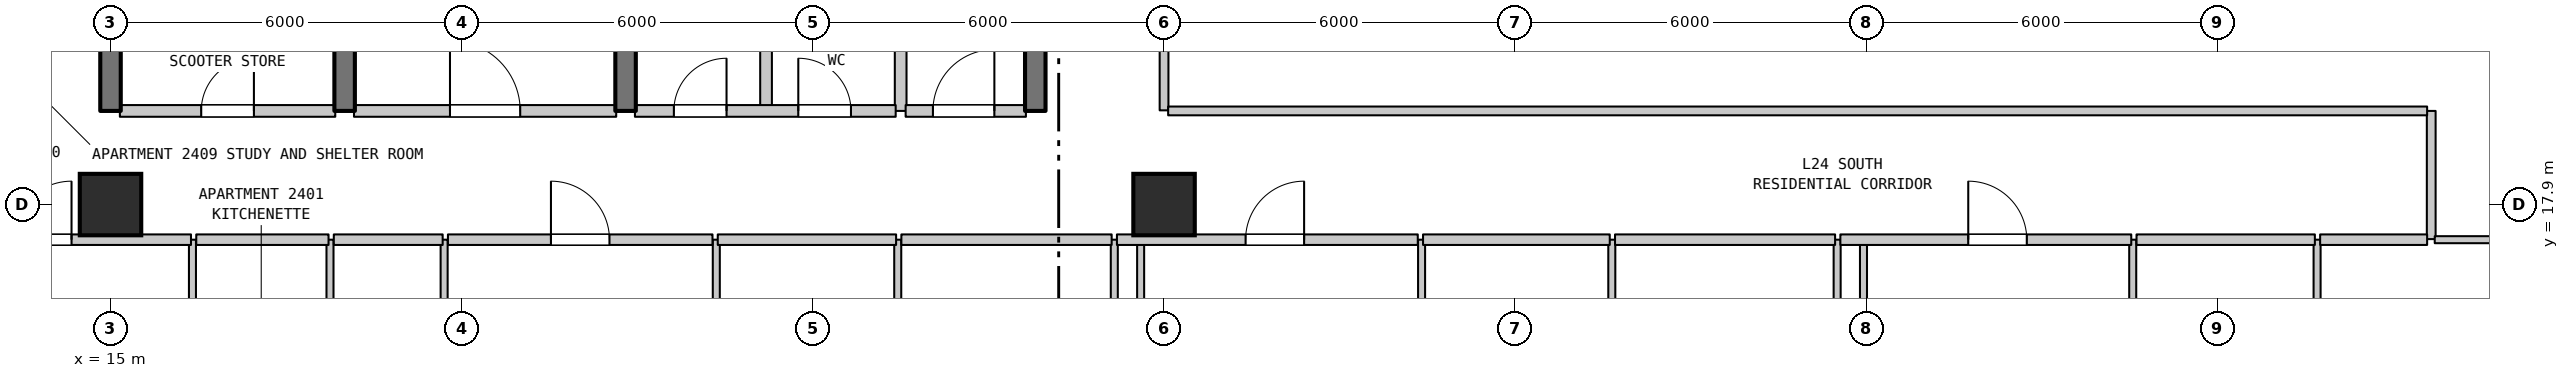
"""IFC4 building model, lengths in metres.
Left out: names, types, materials, properties, quantities, classifications, styles, units other than length and angle.
Written with IfcOpenShell. Run it as: python <this file> out.ifc"""

import sys

from ifc_helpers import new_model, si_unit, direction, frame, frame_2d, origin, origin_2d, place, context, subcontext, project, spatial, rectangle, extrude, element, fill, save


model = new_model("IFC4")
c1 = context("Model", 3, precision=1e-05, world=origin(), true_north=direction((0.0, 1.0)))
c2 = subcontext(c1, "Body", "Model", "MODEL_VIEW")
j1 = project(units=[si_unit("LENGTHUNIT", "METRE"), si_unit("PLANEANGLEUNIT", "RADIAN")], contexts=[c1])
p1 = place(None, origin())
s1 = spatial("IfcSite", under=j1, at=p1, CompositionType="ELEMENT")
p2 = place(p1, origin())
s2 = spatial("IfcBuilding", under=s1, at=p2, CompositionType="ELEMENT")
p3 = place(p2, frame((0.0, 0.0, 102.0)))
s3 = spatial("IfcBuildingStorey", under=s2, at=p3, CompositionType="ELEMENT", Elevation=102.0)
for number, where, z_axis, x_axis in (
    (1, (15.0, 17.9, 0.0), (0.0, 0.0, 1.0), (1.0, 0.0, 0.0)),
    (2, (33.0, 17.9, 0.0), (0.0, 0.0, 1.0), (1.0, 0.0, 0.0)),
):
    element("IfcColumn", number, at=place(p3, frame(where, z_axis=z_axis, x_axis=x_axis)), inside=s3, PredefinedType="COLUMN", context=c2, shape_type="SweptSolid", body=[
        extrude(rectangle(XDim=1.05, YDim=1.05, at=origin_2d()), origin(), (0.0, 0.0, 1.0), 3.7),
    ])
p4 = place(p3, frame((15.0, 19.5, 0.0), z_axis=(0.0, 0.0, 1.0), x_axis=(0.0, 1.0, 0.0)))
e3 = element("IfcWall", 3, at=p4, inside=s3, PredefinedType="SHEAR", context=c2, shape_type="SweptSolid", body=[
    extrude(rectangle(XDim=3.2, YDim=0.35, at=frame_2d((1.6, 0.0))), origin(), (0.0, 0.0, 1.0), 3.385),
])
p5 = place(p3, frame((16.4, 14.1, 0.0), z_axis=(0.0, 0.0, 1.0), x_axis=(0.0, 1.0, 0.0)))
e4 = element("IfcWall", 4, at=p5, inside=s3, PredefinedType="PARTITIONING", context=c2, shape_type="SweptSolid", body=[
    extrude(rectangle(XDim=3.2, YDim=0.12, at=frame_2d((1.6, 0.0))), origin(), (0.0, 0.0, 1.0), 3.385),
])
p6 = place(p5, frame((1.15, 0.0, 0.0)))
e5 = element("IfcOpeningElement", 5, at=p6, cuts=e4, PredefinedType="OPENING", context=c2, shape_type="SweptSolid", body=[
    extrude(rectangle(XDim=0.9, YDim=2.15, at=frame_2d((0.45, 1.075))), frame((0.0, 0.07, 0.0), z_axis=(0.0, -1.0, 0.0), x_axis=(1.0, 0.0, 0.0)), (0.0, 0.0, 1.0), 0.14),
])
p7 = place(p3, frame((18.75, 14.1, 0.0), z_axis=(0.0, 0.0, 1.0), x_axis=(0.0, 1.0, 0.0)))
e6 = element("IfcWall", 6, at=p7, inside=s3, PredefinedType="PARTITIONING", context=c2, shape_type="SweptSolid", body=[
    extrude(rectangle(XDim=3.2, YDim=0.12, at=frame_2d((1.6, 0.0))), origin(), (0.0, 0.0, 1.0), 3.385),
])
p8 = place(p3, frame((19.0, 19.5, 0.0), z_axis=(0.0, 0.0, 1.0), x_axis=(0.0, 1.0, 0.0)))
e7 = element("IfcWall", 7, at=p8, inside=s3, PredefinedType="SHEAR", context=c2, shape_type="SweptSolid", body=[
    extrude(rectangle(XDim=3.2, YDim=0.35, at=frame_2d((1.6, 0.0))), origin(), (0.0, 0.0, 1.0), 3.385),
])
p9 = place(p3, frame((20.7, 6.977, 0.0), z_axis=(0.0, 0.0, 1.0), x_axis=(0.0, 1.0, 0.0)))
e8 = element("IfcWall", 8, at=p9, inside=s3, PredefinedType="PARTITIONING", context=c2, shape_type="SweptSolid", body=[
    extrude(rectangle(XDim=10.323, YDim=0.12, at=frame_2d((5.162, 0.0))), origin(), (0.0, 0.0, 1.0), 3.385),
])
p10 = place(p3, frame((23.8, 19.5, 0.0), z_axis=(0.0, 0.0, 1.0), x_axis=(0.0, 1.0, 0.0)))
e9 = element("IfcWall", 9, at=p10, inside=s3, PredefinedType="SHEAR", context=c2, shape_type="SweptSolid", body=[
    extrude(rectangle(XDim=3.2, YDim=0.35, at=frame_2d((1.6, 0.0))), origin(), (0.0, 0.0, 1.0), 3.385),
])
p11 = place(p3, frame((25.35, 11.15, 0.0), z_axis=(0.0, 0.0, 1.0), x_axis=(0.0, 1.0, 0.0)))
e10 = element("IfcWall", 10, at=p11, inside=s3, PredefinedType="PARTITIONING", context=c2, shape_type="SweptSolid", body=[
    extrude(rectangle(XDim=6.15, YDim=0.12, at=frame_2d((3.075, 0.0))), origin(), (0.0, 0.0, 1.0), 3.385),
])
p12 = place(p3, frame((26.2, 19.5, 0.0), z_axis=(0.0, 0.0, 1.0), x_axis=(0.0, 1.0, 0.0)))
e11 = element("IfcWall", 11, at=p12, inside=s3, PredefinedType="STANDARD", context=c2, shape_type="SweptSolid", body=[
    extrude(rectangle(XDim=3.2, YDim=0.2, at=frame_2d((1.6, 0.0))), origin(), (0.0, 0.0, 1.0), 3.385),
])
p13 = place(p3, frame((28.45, 11.15, 0.0), z_axis=(0.0, 0.0, 1.0), x_axis=(0.0, 1.0, 0.0)))
e12 = element("IfcWall", 12, at=p13, inside=s3, PredefinedType="PARTITIONING", context=c2, shape_type="SweptSolid", body=[
    extrude(rectangle(XDim=6.15, YDim=0.12, at=frame_2d((3.075, 0.0))), origin(), (0.0, 0.0, 1.0), 3.385),
])
p14 = place(p3, frame((28.5, 19.5, 0.0), z_axis=(0.0, 0.0, 1.0), x_axis=(0.0, 1.0, 0.0)))
e13 = element("IfcWall", 13, at=p14, inside=s3, PredefinedType="STANDARD", context=c2, shape_type="SweptSolid", body=[
    extrude(rectangle(XDim=3.2, YDim=0.2, at=frame_2d((1.6, 0.0))), origin(), (0.0, 0.0, 1.0), 3.385),
])
p15 = place(p3, frame((30.8, 19.5, 0.0), z_axis=(0.0, 0.0, 1.0), x_axis=(0.0, 1.0, 0.0)))
e14 = element("IfcWall", 14, at=p15, inside=s3, PredefinedType="SHEAR", context=c2, shape_type="SweptSolid", body=[
    extrude(rectangle(XDim=3.2, YDim=0.35, at=frame_2d((1.6, 0.0))), origin(), (0.0, 0.0, 1.0), 3.385),
])
p16 = place(p3, frame((32.15, 11.15, 0.0), z_axis=(0.0, 0.0, 1.0), x_axis=(0.0, 1.0, 0.0)))
e15 = element("IfcWall", 15, at=p16, inside=s3, PredefinedType="PARTITIONING", context=c2, shape_type="SweptSolid", body=[
    extrude(rectangle(XDim=6.15, YDim=0.12, at=frame_2d((3.075, 0.0))), origin(), (0.0, 0.0, 1.0), 3.385),
])
p17 = place(p3, frame((32.6, 14.85, 0.0), z_axis=(0.0, 0.0, 1.0), x_axis=(0.0, 1.0, 0.0)))
e16 = element("IfcWall", 16, at=p17, inside=s3, PredefinedType="PARTITIONING", context=c2, shape_type="SweptSolid", body=[
    extrude(rectangle(XDim=2.45, YDim=0.12, at=frame_2d((1.225, 0.0))), origin(), (0.0, 0.0, 1.0), 3.385),
])
p18 = place(p3, frame((33.0, 19.51, 0.0), z_axis=(0.0, 0.0, 1.0), x_axis=(0.0, 1.0, 0.0)))
e17 = element("IfcWall", 17, at=p18, inside=s3, PredefinedType="STANDARD", context=c2, shape_type="SweptSolid", body=[
    extrude(rectangle(XDim=6.18, YDim=0.15, at=frame_2d((3.09, 0.0))), origin(), (0.0, 0.0, 1.0), 2.935),
])
for number, where, z_axis, x_axis in (
    (18, (37.4, 11.15, 0.0), (0.0, 0.0, 1.0), (0.0, 1.0, 0.0)),
    (19, (40.65, 11.15, 0.0), (0.0, 0.0, 1.0), (0.0, 1.0, 0.0)),
    (20, (44.5, 11.15, 0.0), (0.0, 0.0, 1.0), (0.0, 1.0, 0.0)),
):
    element("IfcWall", number, at=place(p3, frame(where, z_axis=z_axis, x_axis=x_axis)), inside=s3, PredefinedType="PARTITIONING", context=c2, shape_type="SweptSolid", body=[
        extrude(rectangle(XDim=6.15, YDim=0.12, at=frame_2d((3.075, 0.0))), origin(), (0.0, 0.0, 1.0), 3.385),
    ])
p19 = place(p3, frame((44.95, 0.71, 0.0), z_axis=(0.0, 0.0, 1.0), x_axis=(0.0, 1.0, 0.0)))
e21 = element("IfcWall", 21, at=p19, inside=s3, PredefinedType="PARTITIONING", context=c2, shape_type="SweptSolid", body=[
    extrude(rectangle(XDim=16.59, YDim=0.12, at=frame_2d((8.295, 0.0))), origin(), (0.0, 0.0, 1.0), 3.385),
])
for number, where, z_axis, x_axis in (
    (22, (49.55, 11.15, 0.0), (0.0, 0.0, 1.0), (0.0, 1.0, 0.0)),
    (23, (52.7, 11.15, 0.0), (0.0, 0.0, 1.0), (0.0, 1.0, 0.0)),
):
    element("IfcWall", number, at=place(p3, frame(where, z_axis=z_axis, x_axis=x_axis)), inside=s3, PredefinedType="PARTITIONING", context=c2, shape_type="SweptSolid", body=[
        extrude(rectangle(XDim=6.15, YDim=0.12, at=frame_2d((3.075, 0.0))), origin(), (0.0, 0.0, 1.0), 3.385),
    ])
p20 = place(p3, frame((54.65, 17.31, 0.0), z_axis=(0.0, 0.0, 1.0), x_axis=(0.0, 1.0, 0.0)))
e24 = element("IfcWall", 24, at=p20, inside=s3, PredefinedType="STANDARD", context=c2, shape_type="SweptSolid", body=[
    extrude(rectangle(XDim=2.19, YDim=0.15, at=frame_2d((1.095, 0.0))), origin(), (0.0, 0.0, 1.0), 3.385),
])
p21 = place(p3, frame((12.875, 17.3, 0.0), z_axis=(0.0, 0.0, 1.0), x_axis=(1.0, 0.0, 0.0)))
e25 = element("IfcWall", 25, at=p21, inside=s3, PredefinedType="STANDARD", context=c2, shape_type="SweptSolid", body=[
    extrude(rectangle(XDim=3.5, YDim=0.18, at=frame_2d((1.75, 0.0))), origin(), (0.0, 0.0, 1.0), 3.385),
])
p22 = place(p21, frame((0.459, 0.0, 0.0)))
e26 = element("IfcOpeningElement", 26, at=p22, cuts=e25, PredefinedType="OPENING", context=c2, shape_type="SweptSolid", body=[
    extrude(rectangle(XDim=1.0, YDim=2.15, at=frame_2d((0.5, 1.075))), frame((0.0, 0.1, 0.0), z_axis=(0.0, -1.0, 0.0), x_axis=(1.0, 0.0, 0.0)), (0.0, 0.0, 1.0), 0.2),
])
p23 = place(p3, frame((16.465, 17.3, 0.0), z_axis=(0.0, 0.0, 1.0), x_axis=(1.0, 0.0, 0.0)))
e27 = element("IfcWall", 27, at=p23, inside=s3, PredefinedType="STANDARD", context=c2, shape_type="SweptSolid", body=[
    extrude(rectangle(XDim=2.26, YDim=0.18, at=frame_2d((1.13, 0.0))), origin(), (0.0, 0.0, 1.0), 3.385),
])
p24 = place(p3, frame((18.815, 17.3, 0.0), z_axis=(0.0, 0.0, 1.0), x_axis=(1.0, 0.0, 0.0)))
e28 = element("IfcWall", 28, at=p24, inside=s3, PredefinedType="STANDARD", context=c2, shape_type="SweptSolid", body=[
    extrude(rectangle(XDim=1.86, YDim=0.18, at=frame_2d((0.93, 0.0))), origin(), (0.0, 0.0, 1.0), 3.385),
])
p25 = place(p3, frame((20.765, 17.3, 0.0), z_axis=(0.0, 0.0, 1.0), x_axis=(1.0, 0.0, 0.0)))
e29 = element("IfcWall", 29, at=p25, inside=s3, PredefinedType="STANDARD", context=c2, shape_type="SweptSolid", body=[
    extrude(rectangle(XDim=4.52, YDim=0.18, at=frame_2d((2.26, 0.0))), origin(), (0.0, 0.0, 1.0), 3.385),
])
p26 = place(p25, frame((1.76, 0.0, 0.0)))
e30 = element("IfcOpeningElement", 30, at=p26, cuts=e29, PredefinedType="OPENING", context=c2, shape_type="SweptSolid", body=[
    extrude(rectangle(XDim=1.0, YDim=2.15, at=frame_2d((0.5, 1.075))), frame((0.0, 0.1, 0.0), z_axis=(0.0, -1.0, 0.0), x_axis=(1.0, 0.0, 0.0)), (0.0, 0.0, 1.0), 0.2),
])
p27 = place(p3, frame((25.375, 17.3, 0.0), z_axis=(0.0, 0.0, 1.0), x_axis=(1.0, 0.0, 0.0)))
e31 = element("IfcWall", 31, at=p27, inside=s3, PredefinedType="STANDARD", context=c2, shape_type="SweptSolid", body=[
    extrude(rectangle(XDim=3.047, YDim=0.18, at=frame_2d((1.523, 0.0))), origin(), (0.0, 0.0, 1.0), 3.385),
])
p28 = place(p3, frame((28.512, 17.3, 0.0), z_axis=(0.0, 0.0, 1.0), x_axis=(1.0, 0.0, 0.0)))
e32 = element("IfcWall", 32, at=p28, inside=s3, PredefinedType="STANDARD", context=c2, shape_type="SweptSolid", body=[
    extrude(rectangle(XDim=3.593, YDim=0.18, at=frame_2d((1.796, 0.0))), origin(), (0.0, 0.0, 1.0), 3.385),
])
p29 = place(p3, frame((32.195, 17.3, 0.0), z_axis=(0.0, 0.0, 1.0), x_axis=(1.0, 0.0, 0.0)))
e33 = element("IfcWall", 33, at=p29, inside=s3, PredefinedType="STANDARD", context=c2, shape_type="SweptSolid", body=[
    extrude(rectangle(XDim=5.14, YDim=0.18, at=frame_2d((2.57, 0.0))), origin(), (0.0, 0.0, 1.0), 3.385),
])
p30 = place(p29, frame((2.198, 0.0, 0.0)))
e34 = element("IfcOpeningElement", 34, at=p30, cuts=e33, PredefinedType="OPENING", context=c2, shape_type="SweptSolid", body=[
    extrude(rectangle(XDim=1.0, YDim=2.15, at=frame_2d((0.5, 1.075))), frame((0.0, 0.1, 0.0), z_axis=(0.0, -1.0, 0.0), x_axis=(1.0, 0.0, 0.0)), (0.0, 0.0, 1.0), 0.2),
])
p31 = place(p3, frame((37.425, 17.3, 0.0), z_axis=(0.0, 0.0, 1.0), x_axis=(1.0, 0.0, 0.0)))
e35 = element("IfcWall", 35, at=p31, inside=s3, PredefinedType="STANDARD", context=c2, shape_type="SweptSolid", body=[
    extrude(rectangle(XDim=3.19, YDim=0.18, at=frame_2d((1.595, 0.0))), origin(), (0.0, 0.0, 1.0), 3.385),
])
p32 = place(p3, frame((40.705, 17.3, 0.0), z_axis=(0.0, 0.0, 1.0), x_axis=(1.0, 0.0, 0.0)))
e36 = element("IfcWall", 36, at=p32, inside=s3, PredefinedType="STANDARD", context=c2, shape_type="SweptSolid", body=[
    extrude(rectangle(XDim=3.76, YDim=0.18, at=frame_2d((1.88, 0.0))), origin(), (0.0, 0.0, 1.0), 3.385),
])
p33 = place(p3, frame((44.555, 17.3, 0.0), z_axis=(0.0, 0.0, 1.0), x_axis=(1.0, 0.0, 0.0)))
e37 = element("IfcWall", 37, at=p33, inside=s3, PredefinedType="STANDARD", context=c2, shape_type="SweptSolid", body=[
    extrude(rectangle(XDim=4.97, YDim=0.18, at=frame_2d((2.485, 0.0))), origin(), (0.0, 0.0, 1.0), 3.385),
])
p34 = place(p33, frame((2.185, 0.0, 0.0)))
e38 = element("IfcOpeningElement", 38, at=p34, cuts=e37, PredefinedType="OPENING", context=c2, shape_type="SweptSolid", body=[
    extrude(rectangle(XDim=1.0, YDim=2.15, at=frame_2d((0.5, 1.075))), frame((0.0, 0.1, 0.0), z_axis=(0.0, -1.0, 0.0), x_axis=(1.0, 0.0, 0.0)), (0.0, 0.0, 1.0), 0.2),
])
p35 = place(p3, frame((49.615, 17.3, 0.0), z_axis=(0.0, 0.0, 1.0), x_axis=(1.0, 0.0, 0.0)))
e39 = element("IfcWall", 39, at=p35, inside=s3, PredefinedType="STANDARD", context=c2, shape_type="SweptSolid", body=[
    extrude(rectangle(XDim=3.047, YDim=0.18, at=frame_2d((1.523, 0.0))), origin(), (0.0, 0.0, 1.0), 3.385),
])
p36 = place(p3, frame((52.752, 17.3, 0.0), z_axis=(0.0, 0.0, 1.0), x_axis=(1.0, 0.0, 0.0)))
e40 = element("IfcWall", 40, at=p36, inside=s3, PredefinedType="STANDARD", context=c2, shape_type="SweptSolid", body=[
    extrude(rectangle(XDim=1.828, YDim=0.18, at=frame_2d((0.914, 0.0))), origin(), (0.0, 0.0, 1.0), 3.385),
])
p37 = place(p3, frame((54.71, 17.3, 0.0), z_axis=(0.0, 0.0, 1.0), x_axis=(1.0, 0.0, 0.0)))
e41 = element("IfcWall", 41, at=p37, inside=s3, PredefinedType="PARTITIONING", context=c2, shape_type="SweptSolid", body=[
    extrude(rectangle(XDim=1.635, YDim=0.12, at=frame_2d((0.817, 0.0))), origin(), (0.0, 0.0, 1.0), 3.385),
])
p38 = place(p3, frame((15.16, 19.5, 0.0), z_axis=(0.0, 0.0, 1.0), x_axis=(1.0, 0.0, 0.0)))
e42 = element("IfcWall", 42, at=p38, inside=s3, PredefinedType="STANDARD", context=c2, shape_type="SweptSolid", body=[
    extrude(rectangle(XDim=3.68, YDim=0.2, at=frame_2d((1.84, 0.0))), origin(), (0.0, 0.0, 1.0), 3.385),
])
p39 = place(p38, frame((1.39, 0.0, 0.0)))
e43 = element("IfcOpeningElement", 43, at=p39, cuts=e42, PredefinedType="OPENING", context=c2, shape_type="SweptSolid", body=[
    extrude(rectangle(XDim=0.9, YDim=2.15, at=frame_2d((0.45, 1.075))), frame((0.0, 0.11, 0.0), z_axis=(0.0, -1.0, 0.0), x_axis=(1.0, 0.0, 0.0)), (0.0, 0.0, 1.0), 0.22),
])
p40 = place(p3, frame((19.16, 19.5, 0.0), z_axis=(0.0, 0.0, 1.0), x_axis=(1.0, 0.0, 0.0)))
e44 = element("IfcWall", 44, at=p40, inside=s3, PredefinedType="STANDARD", context=c2, shape_type="SweptSolid", body=[
    extrude(rectangle(XDim=4.48, YDim=0.2, at=frame_2d((2.24, 0.0))), origin(), (0.0, 0.0, 1.0), 3.385),
])
p41 = place(p40, frame((1.64, 0.0, 0.0)))
e45 = element("IfcOpeningElement", 45, at=p41, cuts=e44, PredefinedType="OPENING", context=c2, shape_type="SweptSolid", body=[
    extrude(rectangle(XDim=1.2, YDim=2.2, at=frame_2d((0.6, 1.1))), frame((0.0, 0.11, 0.0), z_axis=(0.0, -1.0, 0.0), x_axis=(1.0, 0.0, 0.0)), (0.0, 0.0, 1.0), 0.22),
])
p42 = place(p3, frame((23.96, 19.5, 0.0), z_axis=(0.0, 0.0, 1.0), x_axis=(1.0, 0.0, 0.0)))
e46 = element("IfcWall", 46, at=p42, inside=s3, PredefinedType="STANDARD", context=c2, shape_type="SweptSolid", body=[
    extrude(rectangle(XDim=4.455, YDim=0.2, at=frame_2d((2.228, 0.0))), origin(), (0.0, 0.0, 1.0), 3.385),
])
p43 = place(p42, frame((0.665, 0.0, 0.0)))
e47 = element("IfcOpeningElement", 47, at=p43, cuts=e46, PredefinedType="OPENING", context=c2, shape_type="SweptSolid", body=[
    extrude(rectangle(XDim=0.9, YDim=2.15, at=frame_2d((0.45, 1.075))), frame((0.0, 0.11, 0.0), z_axis=(0.0, -1.0, 0.0), x_axis=(1.0, 0.0, 0.0)), (0.0, 0.0, 1.0), 0.22),
])
p44 = place(p42, frame((2.791, 0.0, 0.0)))
e48 = element("IfcOpeningElement", 48, at=p44, cuts=e46, PredefinedType="OPENING", context=c2, shape_type="SweptSolid", body=[
    extrude(rectangle(XDim=0.9, YDim=2.15, at=frame_2d((0.45, 1.075))), frame((0.0, 0.11, 0.0), z_axis=(0.0, -1.0, 0.0), x_axis=(1.0, 0.0, 0.0)), (0.0, 0.0, 1.0), 0.22),
])
p45 = place(p3, frame((28.585, 19.5, 0.0), z_axis=(0.0, 0.0, 1.0), x_axis=(1.0, 0.0, 0.0)))
e49 = element("IfcWall", 49, at=p45, inside=s3, PredefinedType="STANDARD", context=c2, shape_type="SweptSolid", body=[
    extrude(rectangle(XDim=2.055, YDim=0.2, at=frame_2d((1.027, 0.0))), origin(), (0.0, 0.0, 1.0), 3.385),
])
p46 = place(p45, frame((0.466, 0.0, 0.0)))
e50 = element("IfcOpeningElement", 50, at=p46, cuts=e49, PredefinedType="OPENING", context=c2, shape_type="SweptSolid", body=[
    extrude(rectangle(XDim=1.05, YDim=2.15, at=frame_2d((0.525, 1.075))), frame((0.0, 0.11, 0.0), z_axis=(0.0, -1.0, 0.0), x_axis=(1.0, 0.0, 0.0)), (0.0, 0.0, 1.0), 0.22),
])
p47 = place(p3, frame((33.07, 19.5, 0.0), z_axis=(0.0, 0.0, 1.0), x_axis=(1.0, 0.0, 0.0)))
e51 = element("IfcWall", 51, at=p47, inside=s3, PredefinedType="STANDARD", context=c2, shape_type="SweptSolid", body=[
    extrude(rectangle(XDim=21.51, YDim=0.15, at=frame_2d((10.755, 0.0))), origin(), (0.0, 0.0, 1.0), 3.385),
])
p48 = place(p22, origin())
e52 = element("IfcDoor", 52, at=p48, inside=s3, OperationType="SINGLE_SWING_RIGHT", PredefinedType="DOOR", context=c2, shape_type="SweptSolid", body=[
    extrude(rectangle(XDim=1.0, YDim=2.15, at=frame_2d((0.5, 1.075))), frame((0.0, 0.025, 0.0), z_axis=(0.0, -1.0, 0.0), x_axis=(1.0, 0.0, 0.0)), (0.0, 0.0, 1.0), 0.05),
])
fill(e26, e52)
p49 = place(p26, origin())
e53 = element("IfcDoor", 53, at=p49, inside=s3, OperationType="SINGLE_SWING_LEFT", PredefinedType="DOOR", context=c2, shape_type="SweptSolid", body=[
    extrude(rectangle(XDim=1.0, YDim=2.15, at=frame_2d((0.5, 1.075))), frame((0.0, 0.025, 0.0), z_axis=(0.0, -1.0, 0.0), x_axis=(1.0, 0.0, 0.0)), (0.0, 0.0, 1.0), 0.05),
])
fill(e30, e53)
p50 = place(p30, origin())
e54 = element("IfcDoor", 54, at=p50, inside=s3, OperationType="SINGLE_SWING_RIGHT", PredefinedType="DOOR", context=c2, shape_type="SweptSolid", body=[
    extrude(rectangle(XDim=1.0, YDim=2.15, at=frame_2d((0.5, 1.075))), frame((0.0, 0.025, 0.0), z_axis=(0.0, -1.0, 0.0), x_axis=(1.0, 0.0, 0.0)), (0.0, 0.0, 1.0), 0.05),
])
fill(e34, e54)
p51 = place(p34, origin())
e55 = element("IfcDoor", 55, at=p51, inside=s3, OperationType="SINGLE_SWING_LEFT", PredefinedType="DOOR", context=c2, shape_type="SweptSolid", body=[
    extrude(rectangle(XDim=1.0, YDim=2.15, at=frame_2d((0.5, 1.075))), frame((0.0, 0.025, 0.0), z_axis=(0.0, -1.0, 0.0), x_axis=(1.0, 0.0, 0.0)), (0.0, 0.0, 1.0), 0.05),
])
fill(e38, e55)
p52 = place(p39, origin())
e56 = element("IfcDoor", 56, at=p52, inside=s3, OperationType="SINGLE_SWING_RIGHT", PredefinedType="DOOR", context=c2, shape_type="SweptSolid", body=[
    extrude(rectangle(XDim=0.9, YDim=2.15, at=frame_2d((0.45, 1.075))), frame((0.0, 0.025, 0.0), z_axis=(0.0, -1.0, 0.0), x_axis=(1.0, 0.0, 0.0)), (0.0, 0.0, 1.0), 0.05),
])
fill(e43, e56)
p53 = place(p41, origin())
e57 = element("IfcDoor", 57, at=p53, inside=s3, OperationType="SINGLE_SWING_LEFT", PredefinedType="DOOR", context=c2, shape_type="SweptSolid", body=[
    extrude(rectangle(XDim=1.2, YDim=2.2, at=frame_2d((0.6, 1.1))), frame((0.0, 0.025, 0.0), z_axis=(0.0, -1.0, 0.0), x_axis=(1.0, 0.0, 0.0)), (0.0, 0.0, 1.0), 0.05),
])
fill(e45, e57)
p54 = place(p43, origin())
e58 = element("IfcDoor", 58, at=p54, inside=s3, OperationType="SINGLE_SWING_RIGHT", PredefinedType="DOOR", context=c2, shape_type="SweptSolid", body=[
    extrude(rectangle(XDim=0.9, YDim=2.15, at=frame_2d((0.45, 1.075))), frame((0.0, 0.025, 0.0), z_axis=(0.0, -1.0, 0.0), x_axis=(1.0, 0.0, 0.0)), (0.0, 0.0, 1.0), 0.05),
])
fill(e47, e58)
p55 = place(p44, origin())
e59 = element("IfcDoor", 59, at=p55, inside=s3, OperationType="SINGLE_SWING_LEFT", PredefinedType="DOOR", context=c2, shape_type="SweptSolid", body=[
    extrude(rectangle(XDim=0.9, YDim=2.15, at=frame_2d((0.45, 1.075))), frame((0.0, 0.025, 0.0), z_axis=(0.0, -1.0, 0.0), x_axis=(1.0, 0.0, 0.0)), (0.0, 0.0, 1.0), 0.05),
])
fill(e48, e59)
p56 = place(p46, origin())
e60 = element("IfcDoor", 60, at=p56, inside=s3, OperationType="SINGLE_SWING_RIGHT", PredefinedType="DOOR", context=c2, shape_type="SweptSolid", body=[
    extrude(rectangle(XDim=1.05, YDim=2.15, at=frame_2d((0.525, 1.075))), frame((0.0, 0.025, 0.0), z_axis=(0.0, -1.0, 0.0), x_axis=(1.0, 0.0, 0.0)), (0.0, 0.0, 1.0), 0.05),
])
fill(e50, e60)
save(model, sys.argv[1])
